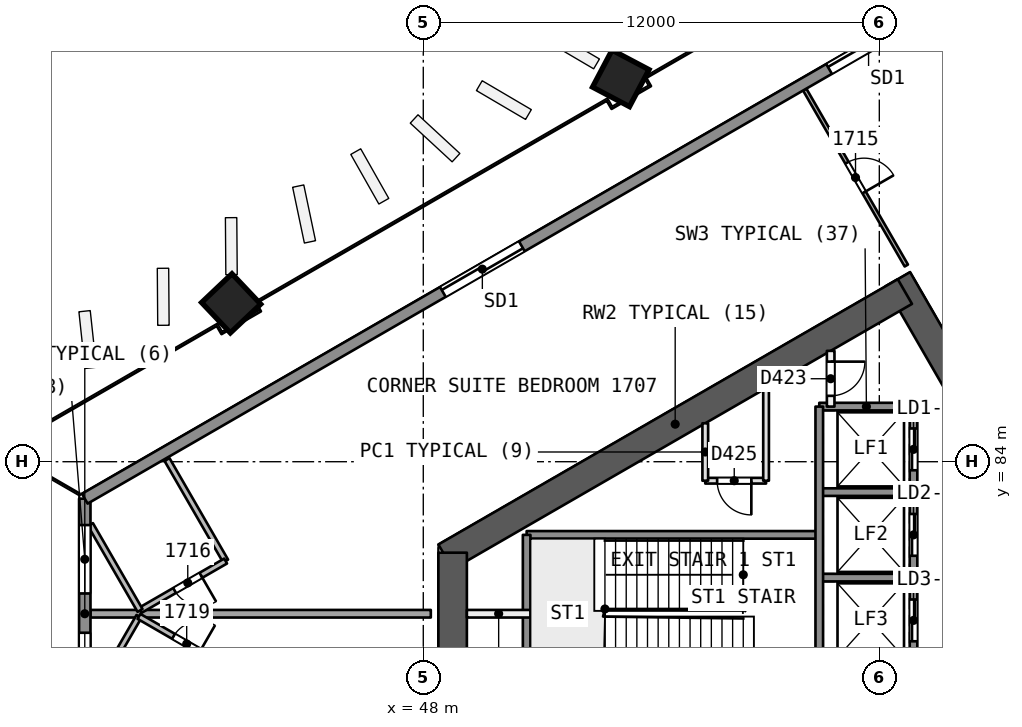
"""IFC4 building model, lengths in metres.
Left out: names, types, materials, properties, quantities, classifications, styles, units other than length and angle.
Written with IfcOpenShell. Run it as: python <this file> out.ifc"""

import sys

from ifc_helpers import new_model, si_unit, direction, frame, frame_2d, origin, origin_2d, place, context, subcontext, project, spatial, rectangle, extrude, element, fill, save


model = new_model("IFC4")
c1 = context("Model", 3, precision=1e-05, world=origin(), true_north=direction((0.0, 1.0)))
c2 = subcontext(c1, "Body", "Model", "MODEL_VIEW")
j1 = project(units=[si_unit("LENGTHUNIT", "METRE"), si_unit("PLANEANGLEUNIT", "RADIAN")], contexts=[c1])
p1 = place(None, origin())
s1 = spatial("IfcSite", under=j1, at=p1, CompositionType="ELEMENT")
p2 = place(p1, origin())
s2 = spatial("IfcBuilding", under=s1, at=p2, CompositionType="ELEMENT")
p3 = place(p2, frame((0.0, 0.0, 75.8)))
s3 = spatial("IfcBuildingStorey", under=s2, at=p3, CompositionType="ELEMENT", Elevation=75.8)
p4 = place(p3, frame((65.567, 80.0, 0.0), z_axis=(0.0, 0.0, 1.0), x_axis=(-0.499988615364, 0.866031976607, 0.0)))
e1 = element("IfcWall", 1, at=p4, inside=s3, PredefinedType="SHEAR", context=c2, shape_type="SweptSolid", body=[
    extrude(rectangle(XDim=10.163, YDim=0.75, at=frame_2d((5.082, 0.0))), origin(), (0.0, 0.0, 1.0), 3.7),
])
p5 = place(p4, frame((0.733, 0.0, 0.0)))
e2 = element("IfcOpeningElement", 2, at=p5, cuts=e1, PredefinedType="OPENING", context=c2, shape_type="SweptSolid", body=[
    extrude(rectangle(XDim=1.2, YDim=2.1, at=frame_2d((0.6, 1.05))), frame((0.0, 0.385, 0.0), z_axis=(0.0, -1.0, 0.0), x_axis=(1.0, 0.0, 0.0)), (0.0, 0.0, 1.0), 0.771),
])
p6 = place(p3, frame((60.673, 88.477, 0.0), z_axis=(0.0, 0.0, 1.0), x_axis=(-0.8660248072, -0.500001033313, 0.0)))
e3 = element("IfcWall", 3, at=p6, inside=s3, PredefinedType="SHEAR", context=c2, shape_type="SweptSolid", body=[
    extrude(rectangle(XDim=13.958, YDim=0.75, at=frame_2d((6.979, 0.0))), origin(), (0.0, 0.0, 1.0), 3.7),
])
p7 = place(p3, frame((48.772, 81.606, 0.0), z_axis=(0.0, 0.0, 1.0), x_axis=(0.0, -1.0, 0.0)))
e4 = element("IfcWall", 4, at=p7, inside=s3, PredefinedType="SHEAR", context=c2, shape_type="SweptSolid", body=[
    extrude(rectangle(XDim=3.429, YDim=0.75, at=frame_2d((1.714, 0.0))), origin(), (0.0, 0.0, 1.0), 3.7),
])
p8 = place(p3, frame((60.673, 71.523, 0.0), z_axis=(0.0, 0.0, 1.0), x_axis=(0.499997052475, 0.866027105532, 0.0)))
e5 = element("IfcWall", 5, at=p8, inside=s3, PredefinedType="SHEAR", context=c2, shape_type="SweptSolid", body=[
    extrude(rectangle(XDim=10.005, YDim=0.75, at=frame_2d((5.002, 0.0))), origin(), (0.0, 0.0, 1.0), 3.7),
])
p9 = place(p8, frame((7.855, 0.0, 0.0)))
e6 = element("IfcOpeningElement", 6, at=p9, cuts=e5, PredefinedType="OPENING", context=c2, shape_type="SweptSolid", body=[
    extrude(rectangle(XDim=1.2, YDim=2.1, at=frame_2d((0.6, 1.05))), frame((0.0, 0.385, 0.0), z_axis=(0.0, -1.0, 0.0), x_axis=(1.0, 0.0, 0.0)), (0.0, 0.0, 1.0), 0.771),
])
p10 = place(p3, frame((53.174, 94.101, 0.0), z_axis=(0.019328516974, -0.012138044789, 0.999739504221), x_axis=(-0.500200160538, 0.865674608258, 0.020180981521)))
e7 = element("IfcColumn", 7, at=p10, inside=s3, PredefinedType="COLUMN", context=c2, shape_type="SweptSolid", body=[
    extrude(rectangle(XDim=1.1, YDim=1.1, at=origin_2d()), origin(), (0.0, 0.0, 1.0), 3.701),
])
p11 = place(p3, frame((42.91, 88.176, 0.0), z_axis=(0.02855911485, -0.006793507689, 0.999569019734), x_axis=(-0.500405785832, 0.865555785013, 0.020180003373)))
e8 = element("IfcColumn", 8, at=p11, inside=s3, PredefinedType="COLUMN", context=c2, shape_type="SweptSolid", body=[
    extrude(rectangle(XDim=1.1, YDim=1.1, at=origin_2d()), origin(), (0.0, 0.0, 1.0), 3.702),
])
p12 = place(p3, frame((61.547, 95.819, 0.0), z_axis=(0.0, 0.0, 1.0), x_axis=(0.499993103482, -0.866029385454, 0.0)))
e9 = element("IfcWall", 9, at=p12, inside=s3, PredefinedType="PARTITIONING", context=c2, shape_type="SweptSolid", body=[
    extrude(rectangle(XDim=13.326, YDim=0.2, at=frame_2d((6.663, 0.0))), origin(), (0.0, 0.0, 1.0), 3.2),
])
p13 = place(p3, frame((58.037, 93.793, 0.0), z_axis=(0.0, 0.0, 1.0), x_axis=(0.499974070055, -0.866040373927, 0.0)))
e10 = element("IfcWall", 10, at=p13, inside=s3, PredefinedType="PARTITIONING", context=c2, shape_type="SweptSolid", body=[
    extrude(rectangle(XDim=5.347, YDim=0.1, at=frame_2d((2.674, 0.0))), origin(), (0.0, 0.0, 1.0), 3.2),
])
p14 = place(p13, frame((2.224, 0.0, 0.0)))
e11 = element("IfcOpeningElement", 11, at=p14, cuts=e10, PredefinedType="OPENING", context=c2, shape_type="SweptSolid", body=[
    extrude(rectangle(XDim=0.9, YDim=2.1, at=frame_2d((0.45, 1.05))), frame((0.0, 0.061, 0.0), z_axis=(0.0, -1.0, 0.0), x_axis=(1.0, 0.0, 0.0)), (0.0, 0.0, 1.0), 0.121),
])
p15 = place(p3, frame((41.256, 84.057, 0.0), z_axis=(0.0, 0.0, 1.0), x_axis=(0.500021696003, -0.866012877229, 0.0)))
e12 = element("IfcWall", 12, at=p15, inside=s3, PredefinedType="PARTITIONING", context=c2, shape_type="SweptSolid", body=[
    extrude(rectangle(XDim=3.084, YDim=0.15, at=frame_2d((1.542, 0.0))), origin(), (0.0, 0.0, 1.0), 3.2),
])
p16 = place(p3, frame((42.798, 81.386, 0.0), z_axis=(0.0, 0.0, 1.0), x_axis=(-0.866021400173, -0.500006934395, 0.0)))
e13 = element("IfcWall", 13, at=p16, inside=s3, PredefinedType="PARTITIONING", context=c2, shape_type="SweptSolid", body=[
    extrude(rectangle(XDim=2.6, YDim=0.15, at=frame_2d((1.3, 0.0))), origin(), (0.0, 0.0, 1.0), 3.2),
])
p17 = place(p16, frame((0.75, 0.0, 0.0)))
e14 = element("IfcOpeningElement", 14, at=p17, cuts=e13, PredefinedType="OPENING", context=c2, shape_type="SweptSolid", body=[
    extrude(rectangle(XDim=0.8, YDim=2.1, at=frame_2d((0.4, 1.05))), frame((0.0, 0.085, 0.0), z_axis=(0.0, -1.0, 0.0), x_axis=(1.0, 0.0, 0.0)), (0.0, 0.0, 1.0), 0.171),
])
p18 = place(p3, frame((40.547, 80.086, 0.0), z_axis=(0.0, 0.0, 1.0), x_axis=(-0.500022016631, 0.866012692104, 0.0)))
e15 = element("IfcWall", 15, at=p18, inside=s3, PredefinedType="PARTITIONING", context=c2, shape_type="SweptSolid", body=[
    extrude(rectangle(XDim=2.61, YDim=0.15, at=frame_2d((1.305, 0.0))), origin(), (0.0, 0.0, 1.0), 3.2),
])
p19 = place(p3, frame((39.241, 80.0, 0.0), z_axis=(0.0, 0.0, 1.0), x_axis=(1.0, 0.0, 0.0)))
e16 = element("IfcWall", 16, at=p19, inside=s3, PredefinedType="PARTITIONING", context=c2, shape_type="SweptSolid", body=[
    extrude(rectangle(XDim=8.957, YDim=0.2, at=frame_2d((4.478, 0.0))), origin(), (0.0, 0.0, 1.0), 3.2),
])
p20 = place(p3, frame((39.241, 77.718, 0.0), z_axis=(0.0, 0.0, 1.0), x_axis=(0.500014808323, 0.866016854026, 0.0)))
e17 = element("IfcWall", 17, at=p20, inside=s3, PredefinedType="PARTITIONING", context=c2, shape_type="SweptSolid", body=[
    extrude(rectangle(XDim=2.554, YDim=0.15, at=frame_2d((1.277, 0.0))), origin(), (0.0, 0.0, 1.0), 3.2),
])
p21 = place(p3, frame((40.519, 79.93, 0.0), z_axis=(0.0, 0.0, 1.0), x_axis=(0.866062058628, -0.499936506574, 0.0)))
e18 = element("IfcWall", 18, at=p21, inside=s3, PredefinedType="PARTITIONING", context=c2, shape_type="SweptSolid", body=[
    extrude(rectangle(XDim=2.6, YDim=0.15, at=frame_2d((1.3, 0.0))), origin(), (0.0, 0.0, 1.0), 3.2),
])
p22 = place(p21, frame((1.05, 0.0, 0.0)))
e19 = element("IfcOpeningElement", 19, at=p22, cuts=e18, PredefinedType="OPENING", context=c2, shape_type="SweptSolid", body=[
    extrude(rectangle(XDim=0.8, YDim=2.1, at=frame_2d((0.4, 1.05))), frame((0.0, 0.085, 0.0), z_axis=(0.0, -1.0, 0.0), x_axis=(1.0, 0.0, 0.0)), (0.0, 0.0, 1.0), 0.171),
])
p23 = place(p3, frame((39.093, 76.973, 0.0), z_axis=(0.0, 0.0, 1.0), x_axis=(0.0, 1.0, 0.0)))
e20 = element("IfcWall", 20, at=p23, inside=s3, PredefinedType="SOLIDWALL", context=c2, shape_type="SweptSolid", body=[
    extrude(rectangle(XDim=6.054, YDim=0.3, at=frame_2d((3.027, 0.0))), origin(), (0.0, 0.0, 1.0), 3.2),
])
p24 = place(p23, frame((3.56, 0.0, 0.9)))
e21 = element("IfcOpeningElement", 21, at=p24, cuts=e20, PredefinedType="OPENING", context=c2, shape_type="SweptSolid", body=[
    extrude(rectangle(XDim=1.8, YDim=1.5, at=frame_2d((0.9, 0.75))), frame((0.0, 0.161, 0.0), z_axis=(0.0, -1.0, 0.0), x_axis=(1.0, 0.0, 0.0)), (0.0, 0.0, 1.0), 0.321),
])
p25 = place(p23, frame((0.727, 0.0, 0.9)))
e22 = element("IfcOpeningElement", 22, at=p25, cuts=e20, PredefinedType="OPENING", context=c2, shape_type="SweptSolid", body=[
    extrude(rectangle(XDim=1.8, YDim=1.5, at=frame_2d((0.9, 0.75))), frame((0.0, 0.161, 0.0), z_axis=(0.0, -1.0, 0.0), x_axis=(1.0, 0.0, 0.0)), (0.0, 0.0, 1.0), 0.321),
])
p26 = place(p3, frame((39.093, 83.027, 0.0), z_axis=(0.0, 0.0, 1.0), x_axis=(0.866024586246, 0.500001416016, 0.0)))
e23 = element("IfcWall", 23, at=p26, inside=s3, PredefinedType="SOLIDWALL", context=c2, shape_type="SweptSolid", body=[
    extrude(rectangle(XDim=59.166, YDim=0.3, at=frame_2d((29.583, 0.0))), origin(), (0.0, 0.0, 1.0), 3.2),
])
p27 = place(p26, frame((27.292, 0.0, 0.0)))
e24 = element("IfcOpeningElement", 24, at=p27, cuts=e23, PredefinedType="OPENING", context=c2, shape_type="SweptSolid", body=[
    extrude(rectangle(XDim=2.4, YDim=2.4, at=frame_2d((1.2, 1.2))), frame((0.0, 0.161, 0.0), z_axis=(0.0, -1.0, 0.0), x_axis=(1.0, 0.0, 0.0)), (0.0, 0.0, 1.0), 0.321),
])
p28 = place(p26, frame((22.615, 0.0, 0.0)))
e25 = element("IfcOpeningElement", 25, at=p28, cuts=e23, PredefinedType="OPENING", context=c2, shape_type="SweptSolid", body=[
    extrude(rectangle(XDim=2.4, YDim=2.4, at=frame_2d((1.2, 1.2))), frame((0.0, 0.161, 0.0), z_axis=(0.0, -1.0, 0.0), x_axis=(1.0, 0.0, 0.0)), (0.0, 0.0, 1.0), 0.321),
])
p29 = place(p26, frame((10.88, 0.0, 0.0)))
e26 = element("IfcOpeningElement", 26, at=p29, cuts=e23, PredefinedType="OPENING", context=c2, shape_type="SweptSolid", body=[
    extrude(rectangle(XDim=2.4, YDim=2.4, at=frame_2d((1.2, 1.2))), frame((0.0, 0.161, 0.0), z_axis=(0.0, -1.0, 0.0), x_axis=(1.0, 0.0, 0.0)), (0.0, 0.0, 1.0), 0.321),
])
p30 = place(p26, frame((43.998, 0.0, 0.0)))
e27 = element("IfcOpeningElement", 27, at=p30, cuts=e23, PredefinedType="OPENING", context=c2, shape_type="SweptSolid", body=[
    extrude(rectangle(XDim=2.4, YDim=2.4, at=frame_2d((1.2, 1.2))), frame((0.0, 0.161, 0.0), z_axis=(0.0, -1.0, 0.0), x_axis=(1.0, 0.0, 0.0)), (0.0, 0.0, 1.0), 0.321),
])
p31 = place(p3, frame((60.9, 85.45, 0.0), z_axis=(0.0, 0.0, 1.0), x_axis=(-1.0, 0.0, 0.0)))
e28 = element("IfcWall", 28, at=p31, inside=s3, PredefinedType="SOLIDWALL", context=c2, shape_type="SweptSolid", body=[
    extrude(rectangle(XDim=2.48, YDim=0.2, at=frame_2d((1.24, 0.0))), origin(), (0.0, 0.0, 1.0), 3.2),
])
p32 = place(p3, frame((57.02, 83.5, 0.0), z_axis=(0.0, 0.0, 1.0), x_axis=(-1.0, 0.0, 0.0)))
e29 = element("IfcWall", 29, at=p32, inside=s3, PredefinedType="PARTITIONING", context=c2, shape_type="SweptSolid", body=[
    extrude(rectangle(XDim=1.6, YDim=0.15, at=frame_2d((0.8, 0.0))), origin(), (0.0, 0.0, 1.0), 3.2),
])
p33 = place(p32, frame((0.387, 0.0, 0.0)))
e30 = element("IfcOpeningElement", 30, at=p33, cuts=e29, PredefinedType="OPENING", context=c2, shape_type="SweptSolid", body=[
    extrude(rectangle(XDim=0.9, YDim=2.1, at=frame_2d((0.45, 1.05))), frame((0.0, 0.085, 0.0), z_axis=(0.0, -1.0, 0.0), x_axis=(1.0, 0.0, 0.0)), (0.0, 0.0, 1.0), 0.171),
])
p34 = place(p3, frame((60.9, 83.2, 0.0), z_axis=(0.0, 0.0, 1.0), x_axis=(-1.0, 0.0, 0.0)))
e31 = element("IfcWall", 31, at=p34, inside=s3, PredefinedType="SOLIDWALL", context=c2, shape_type="SweptSolid", body=[
    extrude(rectangle(XDim=2.48, YDim=0.2, at=frame_2d((1.24, 0.0))), origin(), (0.0, 0.0, 1.0), 3.2),
])
p35 = place(p3, frame((58.42, 82.075, 0.0), z_axis=(0.0, 0.0, 1.0), x_axis=(-1.0, 0.0, 0.0)))
e32 = element("IfcWall", 32, at=p35, inside=s3, PredefinedType="SOLIDWALL", context=c2, shape_type="SweptSolid", body=[
    extrude(rectangle(XDim=7.7, YDim=0.2, at=frame_2d((3.85, 0.0))), origin(), (0.0, 0.0, 1.0), 3.2),
])
p36 = place(p3, frame((60.9, 80.95, 0.0), z_axis=(0.0, 0.0, 1.0), x_axis=(-1.0, 0.0, 0.0)))
e33 = element("IfcWall", 33, at=p36, inside=s3, PredefinedType="SOLIDWALL", context=c2, shape_type="SweptSolid", body=[
    extrude(rectangle(XDim=2.48, YDim=0.2, at=frame_2d((1.24, 0.0))), origin(), (0.0, 0.0, 1.0), 3.2),
])
p37 = place(p3, frame((50.82, 80.0, 0.0), z_axis=(0.0, 0.0, 1.0), x_axis=(-1.0, 0.0, 0.0)))
e34 = element("IfcWall", 34, at=p37, inside=s3, PredefinedType="PARTITIONING", context=c2, shape_type="SweptSolid", body=[
    extrude(rectangle(XDim=1.673, YDim=0.2, at=frame_2d((0.836, 0.0))), origin(), (0.0, 0.0, 1.0), 3.2),
])
p38 = place(p3, frame((60.9, 85.45, 0.0), z_axis=(0.0, 0.0, 1.0), x_axis=(0.0, -1.0, 0.0)))
e35 = element("IfcWall", 35, at=p38, inside=s3, PredefinedType="SOLIDWALL", context=c2, shape_type="SweptSolid", body=[
    extrude(rectangle(XDim=10.9, YDim=0.2, at=frame_2d((5.45, 0.0))), origin(), (0.0, 0.0, 1.0), 3.2),
])
p39 = place(p38, frame((0.575, 0.0, 0.0)))
e36 = element("IfcOpeningElement", 36, at=p39, cuts=e35, PredefinedType="OPENING", context=c2, shape_type="SweptSolid", body=[
    extrude(rectangle(XDim=1.1, YDim=2.1, at=frame_2d((0.55, 1.05))), frame((0.0, 0.11, 0.0), z_axis=(0.0, -1.0, 0.0), x_axis=(1.0, 0.0, 0.0)), (0.0, 0.0, 1.0), 0.221),
])
p40 = place(p38, frame((2.825, 0.0, 0.0)))
e37 = element("IfcOpeningElement", 37, at=p40, cuts=e35, PredefinedType="OPENING", context=c2, shape_type="SweptSolid", body=[
    extrude(rectangle(XDim=1.1, YDim=2.1, at=frame_2d((0.55, 1.05))), frame((0.0, 0.11, 0.0), z_axis=(0.0, -1.0, 0.0), x_axis=(1.0, 0.0, 0.0)), (0.0, 0.0, 1.0), 0.221),
])
p41 = place(p38, frame((5.075, 0.0, 0.0)))
e38 = element("IfcOpeningElement", 38, at=p41, cuts=e35, PredefinedType="OPENING", context=c2, shape_type="SweptSolid", body=[
    extrude(rectangle(XDim=1.1, YDim=2.1, at=frame_2d((0.55, 1.05))), frame((0.0, 0.11, 0.0), z_axis=(0.0, -1.0, 0.0), x_axis=(1.0, 0.0, 0.0)), (0.0, 0.0, 1.0), 0.221),
])
p42 = place(p38, frame((7.325, 0.0, 0.0)))
e39 = element("IfcOpeningElement", 39, at=p42, cuts=e35, PredefinedType="OPENING", context=c2, shape_type="SweptSolid", body=[
    extrude(rectangle(XDim=1.1, YDim=2.1, at=frame_2d((0.55, 1.05))), frame((0.0, 0.11, 0.0), z_axis=(0.0, -1.0, 0.0), x_axis=(1.0, 0.0, 0.0)), (0.0, 0.0, 1.0), 0.221),
])
p43 = place(p3, frame((58.72, 86.917, 0.0), z_axis=(0.0, 0.0, 1.0), x_axis=(0.0, -1.0, 0.0)))
e40 = element("IfcWall", 40, at=p43, inside=s3, PredefinedType="PARTITIONING", context=c2, shape_type="SweptSolid", body=[
    extrude(rectangle(XDim=1.467, YDim=0.2, at=frame_2d((0.733, 0.0))), origin(), (0.0, 0.0, 1.0), 3.2),
])
p44 = place(p43, frame((0.283, 0.0, 0.0)))
e41 = element("IfcOpeningElement", 41, at=p44, cuts=e40, PredefinedType="OPENING", context=c2, shape_type="SweptSolid", body=[
    extrude(rectangle(XDim=0.9, YDim=2.1, at=frame_2d((0.45, 1.05))), frame((0.0, 0.11, 0.0), z_axis=(0.0, -1.0, 0.0), x_axis=(1.0, 0.0, 0.0)), (0.0, 0.0, 1.0), 0.221),
])
p45 = place(p3, frame((58.42, 85.45, 0.0), z_axis=(0.0, 0.0, 1.0), x_axis=(0.0, -1.0, 0.0)))
e42 = element("IfcWall", 42, at=p45, inside=s3, PredefinedType="SOLIDWALL", context=c2, shape_type="SweptSolid", body=[
    extrude(rectangle(XDim=9.0, YDim=0.2, at=frame_2d((4.5, 0.0))), origin(), (0.0, 0.0, 1.0), 3.2),
])
p46 = place(p3, frame((57.02, 85.935, 0.0), z_axis=(0.0, 0.0, 1.0), x_axis=(0.0, -1.0, 0.0)))
e43 = element("IfcWall", 43, at=p46, inside=s3, PredefinedType="PARTITIONING", context=c2, shape_type="SweptSolid", body=[
    extrude(rectangle(XDim=2.435, YDim=0.15, at=frame_2d((1.218, 0.0))), origin(), (0.0, 0.0, 1.0), 3.2),
])
p47 = place(p3, frame((55.42, 85.011, 0.0), z_axis=(0.0, 0.0, 1.0), x_axis=(0.0, -1.0, 0.0)))
e44 = element("IfcWall", 44, at=p47, inside=s3, PredefinedType="PARTITIONING", context=c2, shape_type="SweptSolid", body=[
    extrude(rectangle(XDim=1.511, YDim=0.15, at=frame_2d((0.756, 0.0))), origin(), (0.0, 0.0, 1.0), 3.2),
])
p48 = place(p3, frame((50.72, 82.075, 0.0), z_axis=(0.0, 0.0, 1.0), x_axis=(0.0, -1.0, 0.0)))
e45 = element("IfcWall", 45, at=p48, inside=s3, PredefinedType="SOLIDWALL", context=c2, shape_type="SweptSolid", body=[
    extrude(rectangle(XDim=4.15, YDim=0.2, at=frame_2d((2.075, 0.0))), origin(), (0.0, 0.0, 1.0), 3.2),
])
p49 = place(p14, origin())
e46 = element("IfcDoor", 46, at=p49, inside=s3, OperationType="SINGLE_SWING_RIGHT", PredefinedType="NOTDEFINED", context=c2, shape_type="SweptSolid", body=[
    extrude(rectangle(XDim=0.9, YDim=2.1, at=frame_2d((0.45, 1.05))), frame((0.0, 0.025, 0.0), z_axis=(0.0, -1.0, 0.0), x_axis=(1.0, 0.0, 0.0)), (0.0, 0.0, 1.0), 0.05),
])
fill(e11, e46)
p50 = place(p17, origin())
e47 = element("IfcDoor", 47, at=p50, inside=s3, OperationType="SINGLE_SWING_LEFT", PredefinedType="NOTDEFINED", context=c2, shape_type="SweptSolid", body=[
    extrude(rectangle(XDim=0.8, YDim=2.1, at=frame_2d((0.4, 1.05))), frame((0.0, 0.025, 0.0), z_axis=(0.0, -1.0, 0.0), x_axis=(1.0, 0.0, 0.0)), (0.0, 0.0, 1.0), 0.05),
])
fill(e14, e47)
p51 = place(p22, origin())
e48 = element("IfcDoor", 48, at=p51, inside=s3, OperationType="SINGLE_SWING_RIGHT", PredefinedType="NOTDEFINED", context=c2, shape_type="SweptSolid", body=[
    extrude(rectangle(XDim=0.8, YDim=2.1, at=frame_2d((0.4, 1.05))), frame((0.0, 0.025, 0.0), z_axis=(0.0, -1.0, 0.0), x_axis=(1.0, 0.0, 0.0)), (0.0, 0.0, 1.0), 0.05),
])
fill(e19, e48)
p52 = place(p24, origin())
e49 = element("IfcWindow", 49, at=p52, inside=s3, PartitioningType="SINGLE_PANEL", PredefinedType="WINDOW", context=c2, shape_type="SweptSolid", body=[
    extrude(rectangle(XDim=1.8, YDim=1.5, at=frame_2d((0.9, 0.75))), frame((0.0, 0.03, 0.0), z_axis=(0.0, -1.0, 0.0), x_axis=(1.0, 0.0, 0.0)), (0.0, 0.0, 1.0), 0.06),
])
fill(e21, e49)
p53 = place(p25, origin())
e50 = element("IfcWindow", 50, at=p53, inside=s3, PartitioningType="SINGLE_PANEL", PredefinedType="WINDOW", context=c2, shape_type="SweptSolid", body=[
    extrude(rectangle(XDim=1.8, YDim=1.5, at=frame_2d((0.9, 0.75))), frame((0.0, 0.03, 0.0), z_axis=(0.0, -1.0, 0.0), x_axis=(1.0, 0.0, 0.0)), (0.0, 0.0, 1.0), 0.06),
])
fill(e22, e50)
p54 = place(p28, origin())
e51 = element("IfcDoor", 51, at=p54, inside=s3, OperationType="SLIDING_TO_RIGHT", PredefinedType="NOTDEFINED", context=c2, shape_type="SweptSolid", body=[
    extrude(rectangle(XDim=2.4, YDim=2.4, at=frame_2d((1.2, 1.2))), frame((0.0, 0.025, 0.0), z_axis=(0.0, -1.0, 0.0), x_axis=(1.0, 0.0, 0.0)), (0.0, 0.0, 1.0), 0.05),
])
fill(e25, e51)
p55 = place(p29, origin())
e52 = element("IfcDoor", 52, at=p55, inside=s3, OperationType="SLIDING_TO_LEFT", PredefinedType="NOTDEFINED", context=c2, shape_type="SweptSolid", body=[
    extrude(rectangle(XDim=2.4, YDim=2.4, at=frame_2d((1.2, 1.2))), frame((0.0, 0.025, 0.0), z_axis=(0.0, -1.0, 0.0), x_axis=(1.0, 0.0, 0.0)), (0.0, 0.0, 1.0), 0.05),
])
fill(e26, e52)
p56 = place(p39, origin())
e53 = element("IfcDoor", 53, at=p56, inside=s3, OperationType="SLIDING_TO_RIGHT", PredefinedType="NOTDEFINED", context=c2, shape_type="SweptSolid", body=[
    extrude(rectangle(XDim=1.1, YDim=2.1, at=frame_2d((0.55, 1.05))), frame((0.0, 0.025, 0.0), z_axis=(0.0, -1.0, 0.0), x_axis=(1.0, 0.0, 0.0)), (0.0, 0.0, 1.0), 0.05),
])
fill(e36, e53)
p57 = place(p40, origin())
e54 = element("IfcDoor", 54, at=p57, inside=s3, OperationType="SLIDING_TO_LEFT", PredefinedType="NOTDEFINED", context=c2, shape_type="SweptSolid", body=[
    extrude(rectangle(XDim=1.1, YDim=2.1, at=frame_2d((0.55, 1.05))), frame((0.0, 0.025, 0.0), z_axis=(0.0, -1.0, 0.0), x_axis=(1.0, 0.0, 0.0)), (0.0, 0.0, 1.0), 0.05),
])
fill(e37, e54)
p58 = place(p41, origin())
e55 = element("IfcDoor", 55, at=p58, inside=s3, OperationType="SLIDING_TO_RIGHT", PredefinedType="NOTDEFINED", context=c2, shape_type="SweptSolid", body=[
    extrude(rectangle(XDim=1.1, YDim=2.1, at=frame_2d((0.55, 1.05))), frame((0.0, 0.025, 0.0), z_axis=(0.0, -1.0, 0.0), x_axis=(1.0, 0.0, 0.0)), (0.0, 0.0, 1.0), 0.05),
])
fill(e38, e55)
p59 = place(p44, origin())
e56 = element("IfcDoor", 56, at=p59, inside=s3, OperationType="SINGLE_SWING_LEFT", PredefinedType="NOTDEFINED", context=c2, shape_type="SweptSolid", body=[
    extrude(rectangle(XDim=0.9, YDim=2.1, at=frame_2d((0.45, 1.05))), frame((0.0, 0.025, 0.0), z_axis=(0.0, -1.0, 0.0), x_axis=(1.0, 0.0, 0.0)), (0.0, 0.0, 1.0), 0.05),
])
fill(e41, e56)
p60 = place(p33, origin())
e57 = element("IfcDoor", 57, at=p60, inside=s3, OperationType="SINGLE_SWING_LEFT", PredefinedType="NOTDEFINED", context=c2, shape_type="SweptSolid", body=[
    extrude(rectangle(XDim=0.9, YDim=2.1, at=frame_2d((0.45, 1.05))), frame((0.0, 0.025, 0.0), z_axis=(0.0, -1.0, 0.0), x_axis=(1.0, 0.0, 0.0)), (0.0, 0.0, 1.0), 0.05),
])
fill(e30, e57)
save(model, sys.argv[1])
